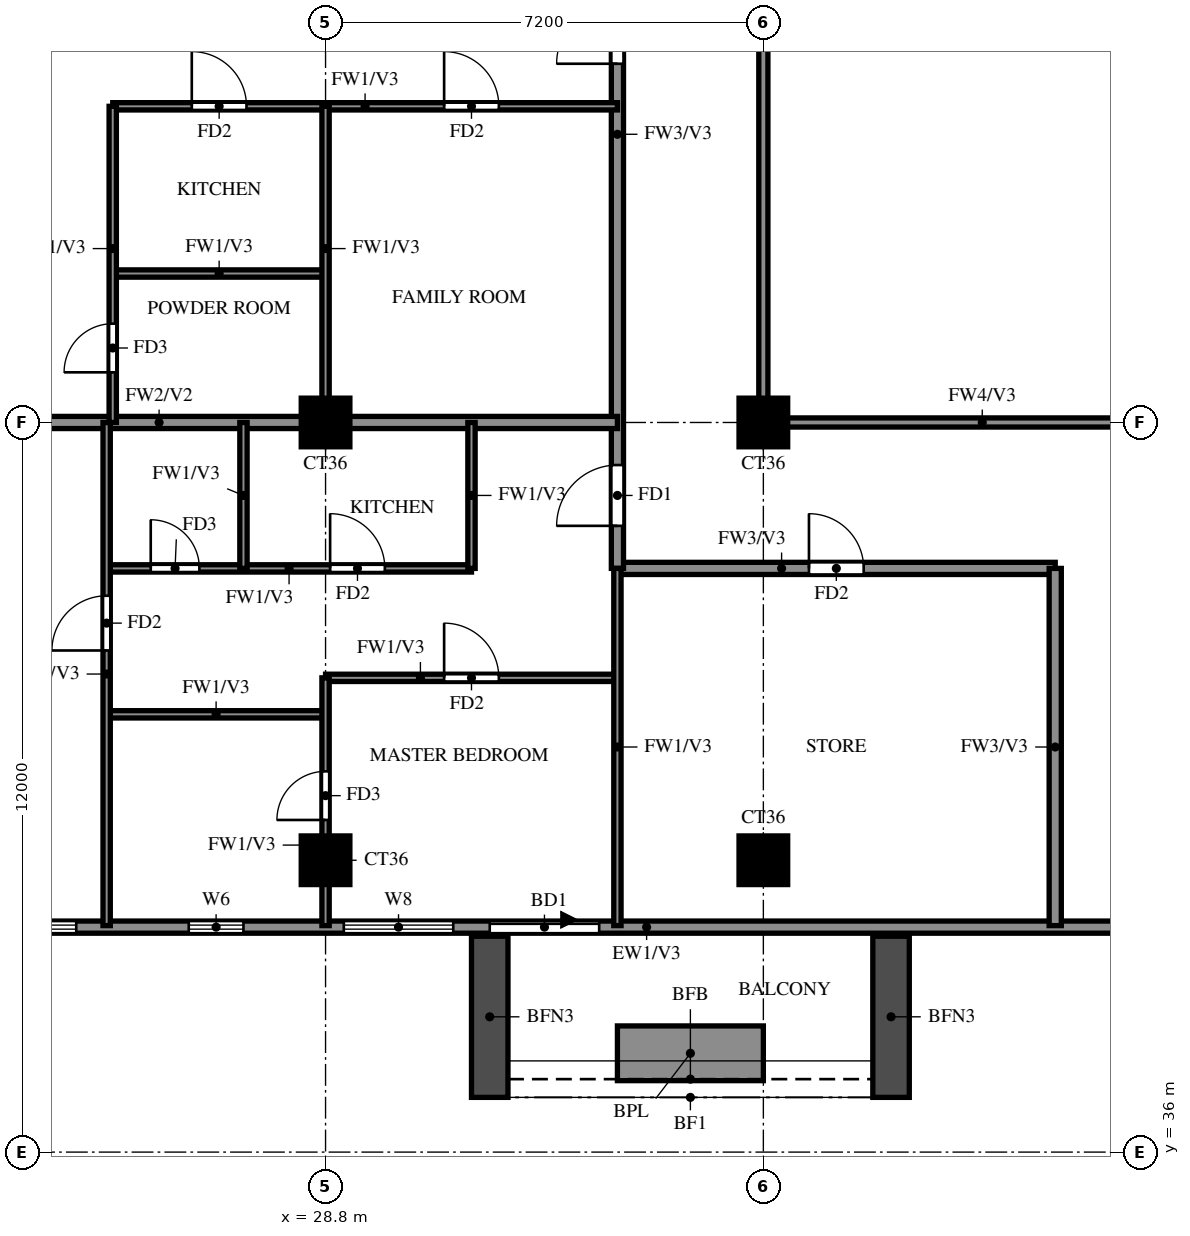
"""IFC4 building model, lengths in metres.
Left out: names, types, materials, properties, quantities, classifications, styles, units other than length and angle.
Written with IfcOpenShell. Run it as: python <this file> out.ifc"""

import sys

from ifc_helpers import new_model, si_unit, direction, frame, frame_2d, origin, origin_2d, place, context, subcontext, project, spatial, rectangle, extrude, source, transform, mapped, element, fill, save


model = new_model("IFC4")
c1 = context("Model", 3, precision=1e-05, world=origin(), true_north=direction((0.0, 1.0)))
c2 = subcontext(c1, "Body", "Model", "MODEL_VIEW")
j1 = project(units=[si_unit("LENGTHUNIT", "METRE"), si_unit("PLANEANGLEUNIT", "RADIAN")], contexts=[c1])
p1 = place(None, origin())
s1 = spatial("IfcSite", under=j1, at=p1, CompositionType="ELEMENT")
p2 = place(p1, origin())
s2 = spatial("IfcBuilding", under=s1, at=p2, CompositionType="ELEMENT")
p3 = place(p2, frame((0.0, 0.0, 246.5)))
s3 = spatial("IfcBuildingStorey", under=s2, at=p3, CompositionType="ELEMENT", Elevation=246.5)
m1 = source(origin(), c2, "Body", "SweptSolid", [
    extrude(rectangle(XDim=0.8, YDim=0.8, at=origin_2d()), origin(), (0.0, 0.0, 1.0), 3.22),
])
for number, where, z_axis, x_axis in (
    (1, (28.8, 40.8, 0.0), (0.0, 0.0, 1.0), (1.0, 0.0, 0.0)),
    (2, (36.0, 40.8, 0.0), (0.0, 0.0, 1.0), (1.0, 0.0, 0.0)),
    (3, (28.8, 48.0, 0.0), (0.0, 0.0, 1.0), (1.0, 0.0, 0.0)),
    (4, (36.0, 48.0, 0.0), (0.0, 0.0, 1.0), (1.0, 0.0, 0.0)),
):
    element("IfcColumn", number, at=place(p3, frame(where, z_axis=z_axis, x_axis=x_axis)), inside=s3, PredefinedType="COLUMN", context=c2, shape_type="MappedRepresentation", body=[
        mapped(m1, transform((0.0, 0.0, 0.0))),
    ])
p4 = place(p3, frame((22.2, 39.7, 0.0), z_axis=(0.0, 0.0, 1.0), x_axis=(1.0, 0.0, 0.0)))
e5 = element("IfcWall", 5, at=p4, inside=s3, PredefinedType="SOLIDWALL", context=c2, shape_type="SweptSolid", body=[
    extrude(rectangle(XDim=19.8, YDim=0.2, at=frame_2d((9.9, 0.0))), origin(), (0.0, 0.0, 1.0), 3.22),
])
p5 = place(p4, frame((9.3, 0.0, 0.0)))
e6 = element("IfcOpeningElement", 6, at=p5, cuts=e5, PredefinedType="OPENING", context=c2, shape_type="SweptSolid", body=[
    extrude(rectangle(XDim=1.8, YDim=2.4, at=frame_2d((0.9, 1.2))), frame((0.0, 0.11, 0.0), z_axis=(0.0, -1.0, 0.0), x_axis=(1.0, 0.0, 0.0)), (0.0, 0.0, 1.0), 0.22),
])
p6 = place(p4, frame((0.7, 0.0, 0.6)))
e7 = element("IfcOpeningElement", 7, at=p6, cuts=e5, PredefinedType="OPENING", context=c2, shape_type="SweptSolid", body=[
    extrude(rectangle(XDim=1.8, YDim=2.4, at=frame_2d((0.9, 1.2))), frame((0.0, 0.11, 0.0), z_axis=(0.0, -1.0, 0.0), x_axis=(1.0, 0.0, 0.0)), (0.0, 0.0, 1.0), 0.22),
])
p7 = place(p4, frame((6.9, 0.0, 0.6)))
e8 = element("IfcOpeningElement", 8, at=p7, cuts=e5, PredefinedType="OPENING", context=c2, shape_type="SweptSolid", body=[
    extrude(rectangle(XDim=1.8, YDim=2.4, at=frame_2d((0.9, 1.2))), frame((0.0, 0.11, 0.0), z_axis=(0.0, -1.0, 0.0), x_axis=(1.0, 0.0, 0.0)), (0.0, 0.0, 1.0), 0.22),
])
p8 = place(p4, frame((4.35, 0.0, 1.5)))
e9 = element("IfcOpeningElement", 9, at=p8, cuts=e5, PredefinedType="OPENING", context=c2, shape_type="SweptSolid", body=[
    extrude(rectangle(XDim=0.9, YDim=0.9, at=frame_2d((0.45, 0.45))), frame((0.0, 0.11, 0.0), z_axis=(0.0, -1.0, 0.0), x_axis=(1.0, 0.0, 0.0)), (0.0, 0.0, 1.0), 0.22),
])
for number, where, z_axis, x_axis in (
    (10, (31.5, 39.55, 0.0), (0.0, 0.0, 1.0), (0.0, -1.0, 0.0)),
    (11, (38.1, 39.55, 0.0), (0.0, 0.0, 1.0), (0.0, -1.0, 0.0)),
):
    element("IfcWall", number, at=place(p3, frame(where, z_axis=z_axis, x_axis=x_axis)), inside=s3, PredefinedType="SOLIDWALL", context=c2, shape_type="SweptSolid", body=[
        extrude(rectangle(XDim=2.65, YDim=0.6, at=frame_2d((1.325, 0.0))), origin(), (0.0, 0.0, 1.0), 2.85),
    ])
p9 = place(p3, frame((33.6, 37.625, 0.0), z_axis=(0.0, 0.0, 1.0), x_axis=(1.0, 0.0, 0.0)))
e12 = element("IfcWall", 12, at=p9, inside=s3, PredefinedType="SOLIDWALL", context=c2, shape_type="SweptSolid", body=[
    extrude(rectangle(XDim=2.4, YDim=0.9, at=frame_2d((1.2, 0.0))), origin(), (0.0, 0.0, 1.0), 0.9),
])
p10 = place(p3, frame((33.6, 45.6, 0.0), z_axis=(0.0, 0.0, 1.0), x_axis=(1.0, 0.0, 0.0)))
e13 = element("IfcWall", 13, at=p10, inside=s3, PredefinedType="SOLIDWALL", context=c2, shape_type="SweptSolid", body=[
    extrude(rectangle(XDim=7.2, YDim=0.2, at=frame_2d((3.6, 0.0))), origin(), (0.0, 0.0, 1.0), 3.22),
])
p11 = place(p10, frame((3.15, 0.0, 0.0)))
e14 = element("IfcOpeningElement", 14, at=p11, cuts=e13, PredefinedType="OPENING", context=c2, shape_type="SweptSolid", body=[
    extrude(rectangle(XDim=0.9, YDim=2.1, at=frame_2d((0.45, 1.05))), frame((0.0, 0.11, 0.0), z_axis=(0.0, -1.0, 0.0), x_axis=(1.0, 0.0, 0.0)), (0.0, 0.0, 1.0), 0.22),
])
p12 = place(p3, frame((33.6, 45.6, 0.0), z_axis=(0.0, 0.0, 1.0), x_axis=(0.0, 1.0, 0.0)))
e15 = element("IfcWall", 15, at=p12, inside=s3, PredefinedType="SOLIDWALL", context=c2, shape_type="SweptSolid", body=[
    extrude(rectangle(XDim=16.8, YDim=0.2, at=frame_2d((8.4, 0.0))), origin(), (0.0, 0.0, 1.0), 3.22),
])
p13 = place(p12, frame((0.7, 0.0, 0.0)))
e16 = element("IfcOpeningElement", 16, at=p13, cuts=e15, PredefinedType="OPENING", context=c2, shape_type="SweptSolid", body=[
    extrude(rectangle(XDim=1.0, YDim=2.1, at=frame_2d((0.5, 1.05))), frame((0.0, 0.11, 0.0), z_axis=(0.0, -1.0, 0.0), x_axis=(1.0, 0.0, 0.0)), (0.0, 0.0, 1.0), 0.22),
])
p14 = place(p12, frame((8.3, 0.0, 0.0)))
e17 = element("IfcOpeningElement", 17, at=p14, cuts=e15, PredefinedType="OPENING", context=c2, shape_type="SweptSolid", body=[
    extrude(rectangle(XDim=1.0, YDim=2.1, at=frame_2d((0.5, 1.05))), frame((0.0, 0.11, 0.0), z_axis=(0.0, -1.0, 0.0), x_axis=(1.0, 0.0, 0.0)), (0.0, 0.0, 1.0), 0.22),
])
p15 = place(p12, frame((15.1, 0.0, 0.0)))
e18 = element("IfcOpeningElement", 18, at=p15, cuts=e15, PredefinedType="OPENING", context=c2, shape_type="SweptSolid", body=[
    extrude(rectangle(XDim=1.0, YDim=2.1, at=frame_2d((0.5, 1.05))), frame((0.0, 0.11, 0.0), z_axis=(0.0, -1.0, 0.0), x_axis=(1.0, 0.0, 0.0)), (0.0, 0.0, 1.0), 0.22),
])
p16 = place(p3, frame((40.8, 39.725, 0.0), z_axis=(0.0, 0.0, 1.0), x_axis=(0.0, 1.0, 0.0)))
e19 = element("IfcWall", 19, at=p16, inside=s3, PredefinedType="SOLIDWALL", context=c2, shape_type="SweptSolid", body=[
    extrude(rectangle(XDim=5.875, YDim=0.2, at=frame_2d((2.938, 0.0))), origin(), (0.0, 0.0, 1.0), 3.22),
])
p17 = place(p3, frame((18.525, 48.0, 0.0), z_axis=(0.0, 0.0, 1.0), x_axis=(1.0, 0.0, 0.0)))
e20 = element("IfcWall", 20, at=p17, inside=s3, PredefinedType="SOLIDWALL", context=c2, shape_type="SweptSolid", body=[
    extrude(rectangle(XDim=15.075, YDim=0.2, at=frame_2d((7.538, 0.0))), origin(), (0.0, 0.0, 1.0), 3.22),
])
p18 = place(p3, frame((25.2, 43.2, 0.0), z_axis=(0.0, 0.0, 1.0), x_axis=(1.0, 0.0, 0.0)))
e21 = element("IfcWall", 21, at=p18, inside=s3, PredefinedType="PARTITIONING", context=c2, shape_type="SweptSolid", body=[
    extrude(rectangle(XDim=3.6, YDim=0.12, at=frame_2d((1.8, 0.0))), origin(), (0.0, 0.0, 1.0), 3.22),
])
p19 = place(p3, frame((28.8, 43.8, 0.0), z_axis=(0.0, 0.0, 1.0), x_axis=(1.0, 0.0, 0.0)))
e22 = element("IfcWall", 22, at=p19, inside=s3, PredefinedType="PARTITIONING", context=c2, shape_type="SweptSolid", body=[
    extrude(rectangle(XDim=4.8, YDim=0.12, at=frame_2d((2.4, 0.0))), origin(), (0.0, 0.0, 1.0), 3.22),
])
p20 = place(p19, frame((1.95, 0.0, 0.0)))
e23 = element("IfcOpeningElement", 23, at=p20, cuts=e22, PredefinedType="OPENING", context=c2, shape_type="SweptSolid", body=[
    extrude(rectangle(XDim=0.9, YDim=2.1, at=frame_2d((0.45, 1.05))), frame((0.0, 0.07, 0.0), z_axis=(0.0, -1.0, 0.0), x_axis=(1.0, 0.0, 0.0)), (0.0, 0.0, 1.0), 0.14),
])
p21 = place(p3, frame((25.2, 45.6, 0.0), z_axis=(0.0, 0.0, 1.0), x_axis=(1.0, 0.0, 0.0)))
e24 = element("IfcWall", 24, at=p21, inside=s3, PredefinedType="PARTITIONING", context=c2, shape_type="SweptSolid", body=[
    extrude(rectangle(XDim=6.0, YDim=0.12, at=frame_2d((3.0, 0.0))), origin(), (0.0, 0.0, 1.0), 3.22),
])
p22 = place(p21, frame((0.725, 0.0, 0.0)))
e25 = element("IfcOpeningElement", 25, at=p22, cuts=e24, PredefinedType="OPENING", context=c2, shape_type="SweptSolid", body=[
    extrude(rectangle(XDim=0.8, YDim=2.1, at=frame_2d((0.4, 1.05))), frame((0.0, 0.07, 0.0), z_axis=(0.0, -1.0, 0.0), x_axis=(1.0, 0.0, 0.0)), (0.0, 0.0, 1.0), 0.14),
])
p23 = place(p21, frame((3.675, 0.0, 0.0)))
e26 = element("IfcOpeningElement", 26, at=p23, cuts=e24, PredefinedType="OPENING", context=c2, shape_type="SweptSolid", body=[
    extrude(rectangle(XDim=0.9, YDim=2.1, at=frame_2d((0.45, 1.05))), frame((0.0, 0.07, 0.0), z_axis=(0.0, -1.0, 0.0), x_axis=(1.0, 0.0, 0.0)), (0.0, 0.0, 1.0), 0.14),
])
p24 = place(p3, frame((25.3, 50.45, 0.0), z_axis=(0.0, 0.0, 1.0), x_axis=(1.0, 0.0, 0.0)))
e27 = element("IfcWall", 27, at=p24, inside=s3, PredefinedType="PARTITIONING", context=c2, shape_type="SweptSolid", body=[
    extrude(rectangle(XDim=3.5, YDim=0.12, at=frame_2d((1.75, 0.0))), origin(), (0.0, 0.0, 1.0), 3.22),
])
p25 = place(p3, frame((25.3, 53.2, 0.0), z_axis=(0.0, 0.0, 1.0), x_axis=(1.0, 0.0, 0.0)))
e28 = element("IfcWall", 28, at=p25, inside=s3, PredefinedType="PARTITIONING", context=c2, shape_type="SweptSolid", body=[
    extrude(rectangle(XDim=8.3, YDim=0.12, at=frame_2d((4.15, 0.0))), origin(), (0.0, 0.0, 1.0), 3.22),
])
p26 = place(p25, frame((1.3, 0.0, 0.0)))
e29 = element("IfcOpeningElement", 29, at=p26, cuts=e28, PredefinedType="OPENING", context=c2, shape_type="SweptSolid", body=[
    extrude(rectangle(XDim=0.9, YDim=2.1, at=frame_2d((0.45, 1.05))), frame((0.0, 0.07, 0.0), z_axis=(0.0, -1.0, 0.0), x_axis=(1.0, 0.0, 0.0)), (0.0, 0.0, 1.0), 0.14),
])
p27 = place(p25, frame((5.45, 0.0, 0.0)))
e30 = element("IfcOpeningElement", 30, at=p27, cuts=e28, PredefinedType="OPENING", context=c2, shape_type="SweptSolid", body=[
    extrude(rectangle(XDim=0.9, YDim=2.1, at=frame_2d((0.45, 1.05))), frame((0.0, 0.07, 0.0), z_axis=(0.0, -1.0, 0.0), x_axis=(1.0, 0.0, 0.0)), (0.0, 0.0, 1.0), 0.14),
])
p28 = place(p3, frame((25.2, 39.725, 0.0), z_axis=(0.0, 0.0, 1.0), x_axis=(0.0, 1.0, 0.0)))
e31 = element("IfcWall", 31, at=p28, inside=s3, PredefinedType="PARTITIONING", context=c2, shape_type="SweptSolid", body=[
    extrude(rectangle(XDim=8.275, YDim=0.12, at=frame_2d((4.137, 0.0))), origin(), (0.0, 0.0, 1.0), 3.22),
])
p29 = place(p28, frame((4.525, 0.0, 0.0)))
e32 = element("IfcOpeningElement", 32, at=p29, cuts=e31, PredefinedType="OPENING", context=c2, shape_type="SweptSolid", body=[
    extrude(rectangle(XDim=0.9, YDim=2.1, at=frame_2d((0.45, 1.05))), frame((0.0, 0.07, 0.0), z_axis=(0.0, -1.0, 0.0), x_axis=(1.0, 0.0, 0.0)), (0.0, 0.0, 1.0), 0.14),
])
p30 = place(p3, frame((25.3, 48.0, 0.0), z_axis=(0.0, 0.0, 1.0), x_axis=(0.0, 1.0, 0.0)))
e33 = element("IfcWall", 33, at=p30, inside=s3, PredefinedType="PARTITIONING", context=c2, shape_type="SweptSolid", body=[
    extrude(rectangle(XDim=5.2, YDim=0.12, at=frame_2d((2.6, 0.0))), origin(), (0.0, 0.0, 1.0), 3.22),
])
p31 = place(p30, frame((0.825, 0.0, 0.0)))
e34 = element("IfcOpeningElement", 34, at=p31, cuts=e33, PredefinedType="OPENING", context=c2, shape_type="SweptSolid", body=[
    extrude(rectangle(XDim=0.8, YDim=2.1, at=frame_2d((0.4, 1.05))), frame((0.0, 0.07, 0.0), z_axis=(0.0, -1.0, 0.0), x_axis=(1.0, 0.0, 0.0)), (0.0, 0.0, 1.0), 0.14),
])
p32 = place(p3, frame((27.45, 45.6, 0.0), z_axis=(0.0, 0.0, 1.0), x_axis=(0.0, 1.0, 0.0)))
e35 = element("IfcWall", 35, at=p32, inside=s3, PredefinedType="PARTITIONING", context=c2, shape_type="SweptSolid", body=[
    extrude(rectangle(XDim=2.4, YDim=0.12, at=frame_2d((1.2, 0.0))), origin(), (0.0, 0.0, 1.0), 3.22),
])
p33 = place(p3, frame((28.8, 39.725, 0.0), z_axis=(0.0, 0.0, 1.0), x_axis=(0.0, 1.0, 0.0)))
e36 = element("IfcWall", 36, at=p33, inside=s3, PredefinedType="PARTITIONING", context=c2, shape_type="SweptSolid", body=[
    extrude(rectangle(XDim=4.075, YDim=0.12, at=frame_2d((2.038, 0.0))), origin(), (0.0, 0.0, 1.0), 3.22),
])
p34 = place(p33, frame((1.738, 0.0, 0.0)))
e37 = element("IfcOpeningElement", 37, at=p34, cuts=e36, PredefinedType="OPENING", context=c2, shape_type="SweptSolid", body=[
    extrude(rectangle(XDim=0.8, YDim=2.1, at=frame_2d((0.4, 1.05))), frame((0.0, 0.07, 0.0), z_axis=(0.0, -1.0, 0.0), x_axis=(1.0, 0.0, 0.0)), (0.0, 0.0, 1.0), 0.14),
])
p35 = place(p3, frame((28.8, 48.0, 0.0), z_axis=(0.0, 0.0, 1.0), x_axis=(0.0, 1.0, 0.0)))
e38 = element("IfcWall", 38, at=p35, inside=s3, PredefinedType="PARTITIONING", context=c2, shape_type="SweptSolid", body=[
    extrude(rectangle(XDim=5.2, YDim=0.12, at=frame_2d((2.6, 0.0))), origin(), (0.0, 0.0, 1.0), 3.22),
])
p36 = place(p3, frame((31.2, 45.6, 0.0), z_axis=(0.0, 0.0, 1.0), x_axis=(0.0, 1.0, 0.0)))
e39 = element("IfcWall", 39, at=p36, inside=s3, PredefinedType="PARTITIONING", context=c2, shape_type="SweptSolid", body=[
    extrude(rectangle(XDim=2.4, YDim=0.12, at=frame_2d((1.2, 0.0))), origin(), (0.0, 0.0, 1.0), 3.22),
])
p37 = place(p3, frame((33.6, 39.725, 0.0), z_axis=(0.0, 0.0, 1.0), x_axis=(0.0, 1.0, 0.0)))
e40 = element("IfcWall", 40, at=p37, inside=s3, PredefinedType="PARTITIONING", context=c2, shape_type="SweptSolid", body=[
    extrude(rectangle(XDim=5.875, YDim=0.12, at=frame_2d((2.938, 0.0))), origin(), (0.0, 0.0, 1.0), 3.22),
])
p38 = place(p3, frame((36.0, 48.0, 0.0), z_axis=(0.0, 0.0, 1.0), x_axis=(1.0, 0.0, 0.0)))
e41 = element("IfcWall", 41, at=p38, inside=s3, PredefinedType="SOLIDWALL", context=c2, shape_type="SweptSolid", body=[
    extrude(rectangle(XDim=7.2, YDim=0.15, at=frame_2d((3.6, 0.0))), origin(), (0.0, 0.0, 1.0), 2.32),
])
p39 = place(p3, frame((36.0, 48.0, 0.0), z_axis=(0.0, 0.0, 1.0), x_axis=(0.0, 1.0, 0.0)))
e42 = element("IfcWall", 42, at=p39, inside=s3, PredefinedType="SOLIDWALL", context=c2, shape_type="SweptSolid", body=[
    extrude(rectangle(XDim=14.4, YDim=0.15, at=frame_2d((7.2, 0.0))), origin(), (0.0, 0.0, 1.0), 2.32),
])
p40 = place(p5, origin())
e43 = element("IfcDoor", 43, at=p40, inside=s3, OperationType="DOUBLE_DOOR_SLIDING", PredefinedType="DOOR", context=c2, shape_type="SweptSolid", body=[
    extrude(rectangle(XDim=1.8, YDim=2.4, at=frame_2d((0.9, 1.2))), frame((0.0, 0.025, 0.0), z_axis=(0.0, -1.0, 0.0), x_axis=(1.0, 0.0, 0.0)), (0.0, 0.0, 1.0), 0.05),
])
fill(e6, e43)
p41 = place(p6, origin())
e44 = element("IfcWindow", 44, at=p41, inside=s3, PartitioningType="DOUBLE_PANEL_VERTICAL", PredefinedType="WINDOW", context=c2, shape_type="SweptSolid", body=[
    extrude(rectangle(XDim=1.8, YDim=2.4, at=frame_2d((0.9, 1.2))), frame((0.0, 0.03, 0.0), z_axis=(0.0, -1.0, 0.0), x_axis=(1.0, 0.0, 0.0)), (0.0, 0.0, 1.0), 0.06),
])
fill(e7, e44)
p42 = place(p7, origin())
e45 = element("IfcWindow", 45, at=p42, inside=s3, PartitioningType="DOUBLE_PANEL_VERTICAL", PredefinedType="WINDOW", context=c2, shape_type="SweptSolid", body=[
    extrude(rectangle(XDim=1.8, YDim=2.4, at=frame_2d((0.9, 1.2))), frame((0.0, 0.03, 0.0), z_axis=(0.0, -1.0, 0.0), x_axis=(1.0, 0.0, 0.0)), (0.0, 0.0, 1.0), 0.06),
])
fill(e8, e45)
p43 = place(p8, origin())
e46 = element("IfcWindow", 46, at=p43, inside=s3, PartitioningType="SINGLE_PANEL", PredefinedType="WINDOW", context=c2, shape_type="SweptSolid", body=[
    extrude(rectangle(XDim=0.9, YDim=0.9, at=frame_2d((0.45, 0.45))), frame((0.0, 0.03, 0.0), z_axis=(0.0, -1.0, 0.0), x_axis=(1.0, 0.0, 0.0)), (0.0, 0.0, 1.0), 0.06),
])
fill(e9, e46)
p44 = place(p13, origin())
e47 = element("IfcDoor", 47, at=p44, inside=s3, OperationType="SINGLE_SWING_RIGHT", PredefinedType="DOOR", context=c2, shape_type="SweptSolid", body=[
    extrude(rectangle(XDim=1.0, YDim=2.1, at=frame_2d((0.5, 1.05))), frame((0.0, 0.025, 0.0), z_axis=(0.0, -1.0, 0.0), x_axis=(1.0, 0.0, 0.0)), (0.0, 0.0, 1.0), 0.05),
])
fill(e16, e47)
p45 = place(p29, origin())
e48 = element("IfcDoor", 48, at=p45, inside=s3, OperationType="SINGLE_SWING_LEFT", PredefinedType="DOOR", context=c2, shape_type="SweptSolid", body=[
    extrude(rectangle(XDim=0.9, YDim=2.1, at=frame_2d((0.45, 1.05))), frame((0.0, 0.025, 0.0), z_axis=(0.0, -1.0, 0.0), x_axis=(1.0, 0.0, 0.0)), (0.0, 0.0, 1.0), 0.05),
])
fill(e32, e48)
p46 = place(p20, origin())
e49 = element("IfcDoor", 49, at=p46, inside=s3, OperationType="SINGLE_SWING_LEFT", PredefinedType="DOOR", context=c2, shape_type="SweptSolid", body=[
    extrude(rectangle(XDim=0.9, YDim=2.1, at=frame_2d((0.45, 1.05))), frame((0.0, 0.025, 0.0), z_axis=(0.0, -1.0, 0.0), x_axis=(1.0, 0.0, 0.0)), (0.0, 0.0, 1.0), 0.05),
])
fill(e23, e49)
p47 = place(p34, origin())
e50 = element("IfcDoor", 50, at=p47, inside=s3, OperationType="SINGLE_SWING_LEFT", PredefinedType="DOOR", context=c2, shape_type="SweptSolid", body=[
    extrude(rectangle(XDim=0.8, YDim=2.1, at=frame_2d((0.4, 1.05))), frame((0.0, 0.025, 0.0), z_axis=(0.0, -1.0, 0.0), x_axis=(1.0, 0.0, 0.0)), (0.0, 0.0, 1.0), 0.05),
])
fill(e37, e50)
p48 = place(p22, origin())
e51 = element("IfcDoor", 51, at=p48, inside=s3, OperationType="SINGLE_SWING_LEFT", PredefinedType="DOOR", context=c2, shape_type="SweptSolid", body=[
    extrude(rectangle(XDim=0.8, YDim=2.1, at=frame_2d((0.4, 1.05))), frame((0.0, 0.025, 0.0), z_axis=(0.0, -1.0, 0.0), x_axis=(1.0, 0.0, 0.0)), (0.0, 0.0, 1.0), 0.05),
])
fill(e25, e51)
p49 = place(p23, origin())
e52 = element("IfcDoor", 52, at=p49, inside=s3, OperationType="SINGLE_SWING_LEFT", PredefinedType="DOOR", context=c2, shape_type="SweptSolid", body=[
    extrude(rectangle(XDim=0.9, YDim=2.1, at=frame_2d((0.45, 1.05))), frame((0.0, 0.025, 0.0), z_axis=(0.0, -1.0, 0.0), x_axis=(1.0, 0.0, 0.0)), (0.0, 0.0, 1.0), 0.05),
])
fill(e26, e52)
p50 = place(p11, origin())
e53 = element("IfcDoor", 53, at=p50, inside=s3, OperationType="SINGLE_SWING_RIGHT", PredefinedType="DOOR", context=c2, shape_type="SweptSolid", body=[
    extrude(rectangle(XDim=0.9, YDim=2.1, at=frame_2d((0.45, 1.05))), frame((0.0, 0.025, 0.0), z_axis=(0.0, -1.0, 0.0), x_axis=(1.0, 0.0, 0.0)), (0.0, 0.0, 1.0), 0.05),
])
fill(e14, e53)
p51 = place(p14, origin())
e54 = element("IfcDoor", 54, at=p51, inside=s3, OperationType="SINGLE_SWING_LEFT", PredefinedType="DOOR", context=c2, shape_type="SweptSolid", body=[
    extrude(rectangle(XDim=1.0, YDim=2.1, at=frame_2d((0.5, 1.05))), frame((0.0, 0.025, 0.0), z_axis=(0.0, -1.0, 0.0), x_axis=(1.0, 0.0, 0.0)), (0.0, 0.0, 1.0), 0.05),
])
fill(e17, e54)
p52 = place(p31, origin())
e55 = element("IfcDoor", 55, at=p52, inside=s3, OperationType="SINGLE_SWING_LEFT", PredefinedType="DOOR", context=c2, shape_type="SweptSolid", body=[
    extrude(rectangle(XDim=0.8, YDim=2.1, at=frame_2d((0.4, 1.05))), frame((0.0, 0.025, 0.0), z_axis=(0.0, -1.0, 0.0), x_axis=(1.0, 0.0, 0.0)), (0.0, 0.0, 1.0), 0.05),
])
fill(e34, e55)
p53 = place(p26, origin())
e56 = element("IfcDoor", 56, at=p53, inside=s3, OperationType="SINGLE_SWING_RIGHT", PredefinedType="DOOR", context=c2, shape_type="SweptSolid", body=[
    extrude(rectangle(XDim=0.9, YDim=2.1, at=frame_2d((0.45, 1.05))), frame((0.0, 0.025, 0.0), z_axis=(0.0, -1.0, 0.0), x_axis=(1.0, 0.0, 0.0)), (0.0, 0.0, 1.0), 0.05),
])
fill(e29, e56)
p54 = place(p27, origin())
e57 = element("IfcDoor", 57, at=p54, inside=s3, OperationType="SINGLE_SWING_LEFT", PredefinedType="DOOR", context=c2, shape_type="SweptSolid", body=[
    extrude(rectangle(XDim=0.9, YDim=2.1, at=frame_2d((0.45, 1.05))), frame((0.0, 0.025, 0.0), z_axis=(0.0, -1.0, 0.0), x_axis=(1.0, 0.0, 0.0)), (0.0, 0.0, 1.0), 0.05),
])
fill(e30, e57)
save(model, sys.argv[1])
